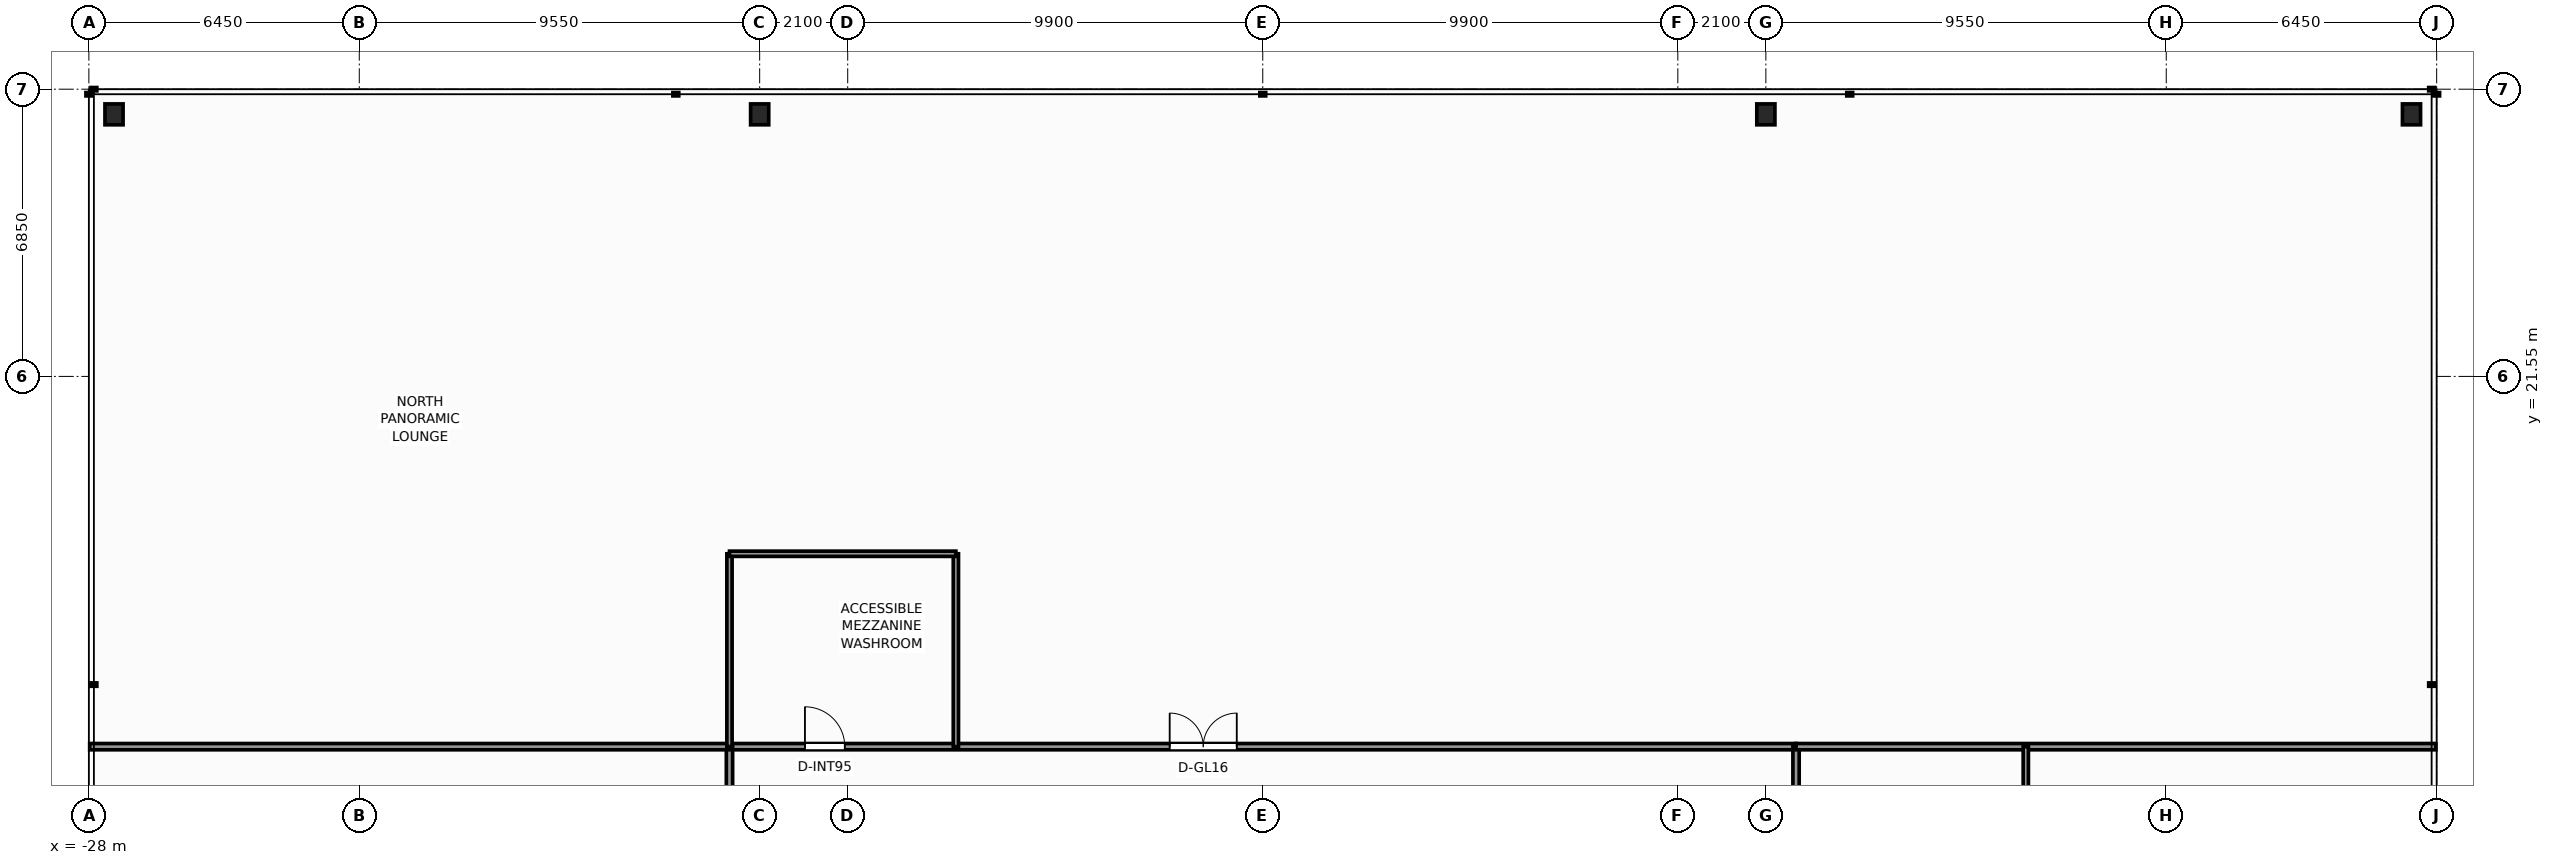
"""IFC4 building model, lengths in metres.
Left out: names, types, materials, properties, quantities, classifications, styles, units other than length and angle.
Written with IfcOpenShell. Run it as: python <this file> out.ifc"""

import sys

from ifc_helpers import new_model, si_unit, direction, frame, frame_2d, origin, origin_2d, place, context, subcontext, project, spatial, rectangle, i_section, extrude, element, fill, save


model = new_model("IFC4")
c1 = context("Model", 3, precision=1e-05, world=origin(), true_north=direction((0.0, 1.0)))
c2 = subcontext(c1, "Body", "Model", "MODEL_VIEW")
j1 = project(units=[si_unit("LENGTHUNIT", "METRE"), si_unit("PLANEANGLEUNIT", "RADIAN")], contexts=[c1])
p1 = place(None, origin())
s1 = spatial("IfcSite", under=j1, at=p1, CompositionType="ELEMENT")
p2 = place(p1, origin())
s2 = spatial("IfcBuilding", under=s1, at=p2, CompositionType="ELEMENT")
p3 = place(p2, frame((0.0, 0.0, 5.5)))
s3 = spatial("IfcBuildingStorey", under=s2, at=p3, CompositionType="ELEMENT", Elevation=5.5)
for number, where, z_axis, x_axis in (
    (1, (-27.4, 27.8, 0.0), (0.0, 0.0, 1.0), (1.0, 0.0, 0.0)),
    (2, (-12.0, 27.8, 0.0), (0.0, 0.0, 1.0), (1.0, 0.0, 0.0)),
    (3, (12.0, 27.8, 0.0), (0.0, 0.0, 1.0), (1.0, 0.0, 0.0)),
    (4, (27.4, 27.8, 0.0), (0.0, 0.0, 1.0), (1.0, 0.0, 0.0)),
):
    element("IfcColumn", number, at=place(p3, frame(where, z_axis=z_axis, x_axis=x_axis)), inside=s3, PredefinedType="COLUMN", context=c2, shape_type="SweptSolid", body=[
        extrude(i_section(OverallWidth=0.432, OverallDepth=0.498, WebThickness=0.056, FlangeThickness=0.089, FilletRadius=0.025, at=origin_2d()), origin(), (0.0, 0.0, 1.0), 4.5),
    ])
p4 = place(p3, frame((-12.72, 12.72, 0.0), z_axis=(0.0, 0.0, 1.0), x_axis=(1.0, 0.0, 0.0)))
e5 = element("IfcWall", 5, at=p4, inside=s3, PredefinedType="PARTITIONING", context=c2, shape_type="SweptSolid", body=[
    extrude(rectangle(XDim=25.44, YDim=0.15, at=frame_2d((12.72, 0.0))), origin(), (0.0, 0.0, 1.0), 3.194),
])
p5 = place(p4, frame((1.8, 0.0, 0.0)))
e6 = element("IfcOpeningElement", 6, at=p5, cuts=e5, PredefinedType="OPENING", context=c2, shape_type="SweptSolid", body=[
    extrude(rectangle(XDim=0.95, YDim=2.06, at=frame_2d((0.475, 1.03))), frame((0.0, 0.085, 0.0), z_axis=(0.0, -1.0, 0.0), x_axis=(1.0, 0.0, 0.0)), (0.0, 0.0, 1.0), 0.17),
])
p6 = place(p4, frame((10.5, 0.0, 0.0)))
e7 = element("IfcOpeningElement", 7, at=p6, cuts=e5, PredefinedType="OPENING", context=c2, shape_type="SweptSolid", body=[
    extrude(rectangle(XDim=1.6, YDim=2.3, at=frame_2d((0.8, 1.15))), frame((0.0, 0.085, 0.0), z_axis=(0.0, -1.0, 0.0), x_axis=(1.0, 0.0, 0.0)), (0.0, 0.0, 1.0), 0.17),
])
p7 = place(p3, frame((-12.72, 1.72, 0.0), z_axis=(0.0, 0.0, 1.0), x_axis=(0.0, 1.0, 0.0)))
e8 = element("IfcWall", 8, at=p7, inside=s3, PredefinedType="PARTITIONING", context=c2, shape_type="SweptSolid", body=[
    extrude(rectangle(XDim=11.0, YDim=0.15, at=frame_2d((5.5, 0.0))), origin(), (0.0, 0.0, 1.0), 3.194),
])
p8 = place(p7, frame((3.2, 0.0, 0.0)))
e9 = element("IfcOpeningElement", 9, at=p8, cuts=e8, PredefinedType="OPENING", context=c2, shape_type="SweptSolid", body=[
    extrude(rectangle(XDim=1.2, YDim=2.2, at=frame_2d((0.6, 1.1))), frame((0.0, 0.085, 0.0), z_axis=(0.0, -1.0, 0.0), x_axis=(1.0, 0.0, 0.0)), (0.0, 0.0, 1.0), 0.17),
])
p9 = place(p3, frame((12.72, 1.72, 0.0), z_axis=(0.0, 0.0, 1.0), x_axis=(0.0, 1.0, 0.0)))
e10 = element("IfcWall", 10, at=p9, inside=s3, PredefinedType="PARTITIONING", context=c2, shape_type="SweptSolid", body=[
    extrude(rectangle(XDim=11.0, YDim=0.15, at=frame_2d((5.5, 0.0))), origin(), (0.0, 0.0, 1.0), 3.194),
])
p10 = place(p9, frame((6.58, 0.0, 0.0)))
e11 = element("IfcOpeningElement", 11, at=p10, cuts=e10, PredefinedType="OPENING", context=c2, shape_type="SweptSolid", body=[
    extrude(rectangle(XDim=0.95, YDim=2.06, at=frame_2d((0.475, 1.03))), frame((0.0, 0.085, 0.0), z_axis=(0.0, -1.0, 0.0), x_axis=(1.0, 0.0, 0.0)), (0.0, 0.0, 1.0), 0.17),
])
p11 = place(p9, frame((1.8, 0.0, 0.0)))
e12 = element("IfcOpeningElement", 12, at=p11, cuts=e10, PredefinedType="OPENING", context=c2, shape_type="SweptSolid", body=[
    extrude(rectangle(XDim=0.95, YDim=2.06, at=frame_2d((0.475, 1.03))), frame((0.0, 0.085, 0.0), z_axis=(0.0, -1.0, 0.0), x_axis=(1.0, 0.0, 0.0)), (0.0, 0.0, 1.0), 0.17),
])
for number, where, z_axis, x_axis in (
    (13, (-27.98, 12.72, 0.0), (0.0, 0.0, 1.0), (1.0, 0.0, 0.0)),
    (14, (12.72, 12.72, 0.0), (0.0, 0.0, 1.0), (1.0, 0.0, 0.0)),
):
    element("IfcWall", number, at=place(p3, frame(where, z_axis=z_axis, x_axis=x_axis)), inside=s3, PredefinedType="PARTITIONING", context=c2, shape_type="SweptSolid", body=[
        extrude(rectangle(XDim=15.26, YDim=0.15, at=frame_2d((7.63, 0.0))), origin(), (0.0, 0.0, 1.0), 3.589),
    ])
p12 = place(p3, frame((18.2, 7.2, 0.0), z_axis=(0.0, 0.0, 1.0), x_axis=(0.0, 1.0, 0.0)))
e15 = element("IfcWall", 15, at=p12, inside=s3, PredefinedType="PARTITIONING", context=c2, shape_type="SweptSolid", body=[
    extrude(rectangle(XDim=5.52, YDim=0.125, at=frame_2d((2.76, 0.0))), origin(), (0.0, 0.0, 1.0), 3.194),
])
p13 = place(p12, frame((1.2, 0.0, 0.0)))
e16 = element("IfcOpeningElement", 16, at=p13, cuts=e15, PredefinedType="OPENING", context=c2, shape_type="SweptSolid", body=[
    extrude(rectangle(XDim=0.9, YDim=2.06, at=frame_2d((0.45, 1.03))), frame((0.0, 0.073, 0.0), z_axis=(0.0, -1.0, 0.0), x_axis=(1.0, 0.0, 0.0)), (0.0, 0.0, 1.0), 0.145),
])
for number, where, z_axis, x_axis in (
    (17, (-12.72, 12.72, 0.0), (0.0, 0.0, 1.0), (0.0, 1.0, 0.0)),
    (18, (-7.32, 12.72, 0.0), (0.0, 0.0, 1.0), (0.0, 1.0, 0.0)),
):
    element("IfcWall", number, at=place(p3, frame(where, z_axis=z_axis, x_axis=x_axis)), inside=s3, PredefinedType="PARTITIONING", context=c2, shape_type="SweptSolid", body=[
        extrude(rectangle(XDim=4.6, YDim=0.125, at=frame_2d((2.3, 0.0))), origin(), (0.0, 0.0, 1.0), 4.22),
    ])
p14 = place(p3, frame((-12.72, 17.32, 0.0), z_axis=(0.0, 0.0, 1.0), x_axis=(1.0, 0.0, 0.0)))
e19 = element("IfcWall", 19, at=p14, inside=s3, PredefinedType="PARTITIONING", context=c2, shape_type="SweptSolid", body=[
    extrude(rectangle(XDim=5.4, YDim=0.125, at=frame_2d((2.7, 0.0))), origin(), (0.0, 0.0, 1.0), 3.194),
])
p15 = place(p5, origin())
e20 = element("IfcDoor", 20, at=p15, inside=s3, OperationType="SINGLE_SWING_LEFT", PredefinedType="DOOR", context=c2, shape_type="SweptSolid", body=[
    extrude(rectangle(XDim=0.95, YDim=2.06, at=frame_2d((0.475, 1.03))), frame((0.0, 0.025, 0.0), z_axis=(0.0, -1.0, 0.0), x_axis=(1.0, 0.0, 0.0)), (0.0, 0.0, 1.0), 0.05),
])
fill(e6, e20)
p16 = place(p6, origin())
e21 = element("IfcDoor", 21, at=p16, inside=s3, OperationType="DOUBLE_DOOR_SINGLE_SWING", PredefinedType="DOOR", context=c2, shape_type="SweptSolid", body=[
    extrude(rectangle(XDim=1.6, YDim=2.3, at=frame_2d((0.8, 1.15))), frame((0.0, 0.025, 0.0), z_axis=(0.0, -1.0, 0.0), x_axis=(1.0, 0.0, 0.0)), (0.0, 0.0, 1.0), 0.05),
])
fill(e7, e21)
save(model, sys.argv[1])
